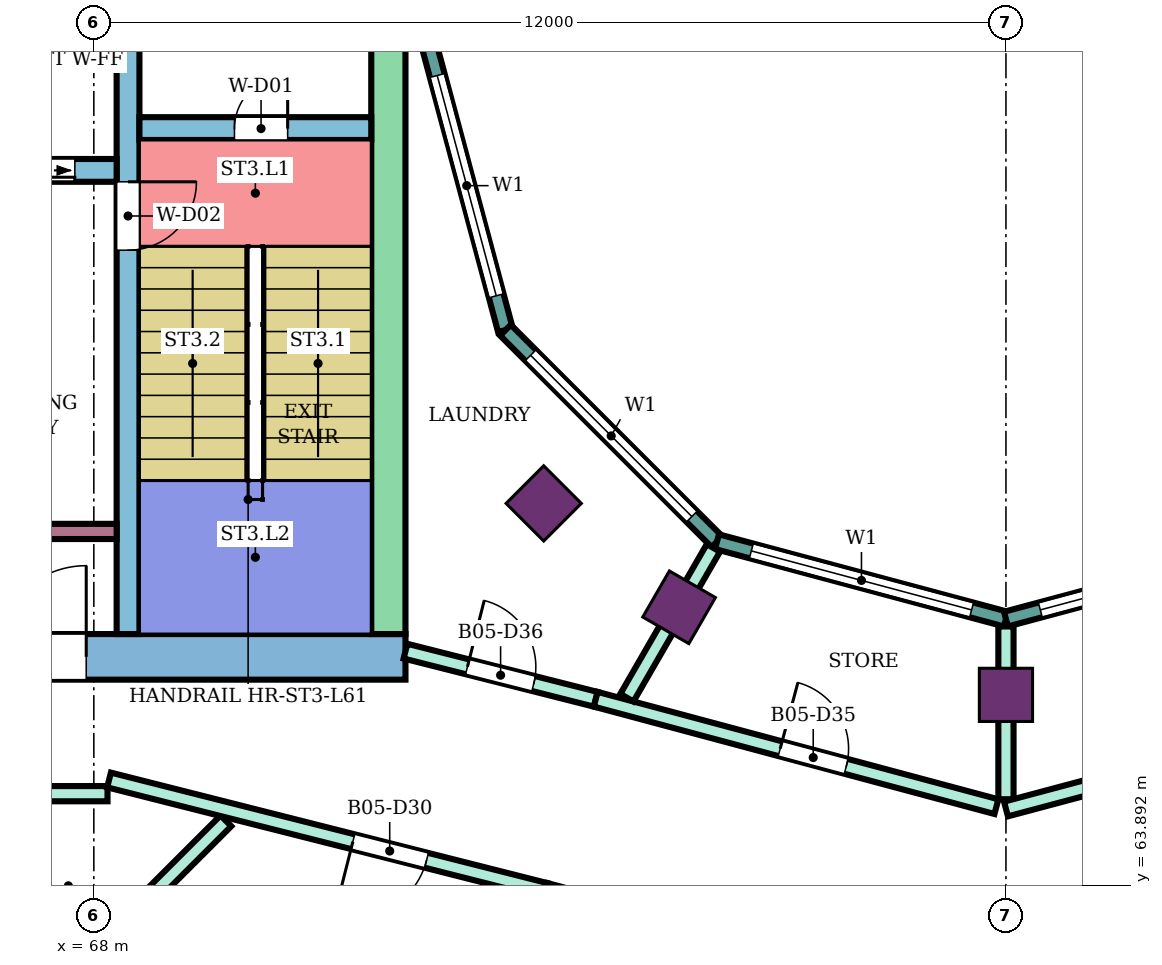
"""IFC4 building model, lengths in metres.
Left out: names, types, materials, properties, quantities, classifications, styles, units other than length and angle.
Written with IfcOpenShell. Run it as: python <this file> out.ifc"""

import sys

from ifc_helpers import new_model, si_unit, direction, frame, frame_2d, origin, origin_2d, place, context, subcontext, project, spatial, rectangle, extrude, element, fill, save


model = new_model("IFC4")
c1 = context("Model", 3, precision=1e-05, world=origin(), true_north=direction((0.0, 1.0)))
c2 = subcontext(c1, "Body", "Model", "MODEL_VIEW")
j1 = project(units=[si_unit("LENGTHUNIT", "METRE"), si_unit("PLANEANGLEUNIT", "RADIAN")], contexts=[c1])
p1 = place(None, origin())
s1 = spatial("IfcSite", under=j1, at=p1, CompositionType="ELEMENT")
p2 = place(p1, origin())
s2 = spatial("IfcBuilding", under=s1, at=p2, CompositionType="ELEMENT")
p3 = place(p2, frame((0.0, 0.0, 266.7)))
s3 = spatial("IfcBuildingStorey", under=s2, at=p3, CompositionType="ELEMENT", Elevation=266.7)
for number, where, z_axis, x_axis in (
    (1, (73.919, 68.919, 0.0), (0.0, 0.0, 1.0), (-0.707, -0.707, 0.0)),
    (2, (75.7, 67.552, 0.0), (0.0, 0.0, 1.0), (-0.5, -0.866, 0.0)),
    (3, (80.0, 66.4, 0.0), (0.0, 0.0, 1.0), (0.0, -1.0, 0.0)),
):
    element("IfcColumn", number, at=place(p3, frame(where, z_axis=z_axis, x_axis=x_axis)), inside=s3, PredefinedType="COLUMN", context=c2, shape_type="SweptSolid", body=[
        extrude(rectangle(XDim=0.7, YDim=0.7, at=origin_2d()), origin(), (0.0, 0.0, 1.0), 4.2),
    ])
p4 = place(p3, frame((72.1, 66.9, 0.0), z_axis=(0.0, 0.0, 1.0), x_axis=(-1.0, 0.0, 0.0)))
e4 = element("IfcWall", 4, at=p4, inside=s3, PredefinedType="SHEAR", context=c2, shape_type="SweptSolid", body=[
    extrude(rectangle(XDim=14.9, YDim=0.6, at=frame_2d((7.45, 0.0))), origin(), (0.0, 0.0, 1.0), 3.75),
])
p5 = place(p4, frame((4.2, 0.0, 0.0)))
e5 = element("IfcOpeningElement", 5, at=p5, cuts=e4, PredefinedType="OPENING", context=c2, shape_type="SweptSolid", body=[
    extrude(rectangle(XDim=2.4, YDim=2.4, at=frame_2d((1.2, 1.2))), frame((0.0, 0.31, 0.0), z_axis=(0.0, -1.0, 0.0), x_axis=(1.0, 0.0, 0.0)), (0.0, 0.0, 1.0), 0.62),
])
p6 = place(p3, frame((71.875, 75.0, 0.0), z_axis=(0.0, 0.0, 1.0), x_axis=(0.0, -1.0, 0.0)))
e6 = element("IfcWall", 6, at=p6, inside=s3, PredefinedType="SHEAR", context=c2, shape_type="SweptSolid", body=[
    extrude(rectangle(XDim=7.8, YDim=0.45, at=frame_2d((3.9, 0.0))), origin(), (0.0, 0.0, 1.0), 3.75),
])
p7 = place(p3, frame((68.45, 75.0, 0.0), z_axis=(0.0, 0.0, 1.0), x_axis=(0.0, -1.0, 0.0)))
e7 = element("IfcWall", 7, at=p7, inside=s3, PredefinedType="SHEAR", context=c2, shape_type="SweptSolid", body=[
    extrude(rectangle(XDim=7.8, YDim=0.3, at=frame_2d((3.9, 0.0))), origin(), (0.0, 0.0, 1.0), 3.75),
])
p8 = place(p7, frame((1.85, 0.0, 0.0)))
e8 = element("IfcOpeningElement", 8, at=p8, cuts=e7, PredefinedType="OPENING", context=c2, shape_type="SweptSolid", body=[
    extrude(rectangle(XDim=0.9, YDim=2.1, at=frame_2d((0.45, 1.05))), frame((0.0, 0.16, 0.0), z_axis=(0.0, -1.0, 0.0), x_axis=(1.0, 0.0, 0.0)), (0.0, 0.0, 1.0), 0.32),
])
p9 = place(p3, frame((71.65, 73.85, 0.0), z_axis=(0.0, 0.0, 1.0), x_axis=(-1.0, 0.0, 0.0)))
e9 = element("IfcWall", 9, at=p9, inside=s3, PredefinedType="SHEAR", context=c2, shape_type="SweptSolid", body=[
    extrude(rectangle(XDim=3.05, YDim=0.3, at=frame_2d((1.525, 0.0))), origin(), (0.0, 0.0, 1.0), 3.75),
])
p10 = place(p9, frame((1.1, 0.0, 0.0)))
e10 = element("IfcOpeningElement", 10, at=p10, cuts=e9, PredefinedType="OPENING", context=c2, shape_type="SweptSolid", body=[
    extrude(rectangle(XDim=0.7, YDim=2.0, at=frame_2d((0.35, 1.0))), frame((0.0, 0.16, 0.0), z_axis=(0.0, -1.0, 0.0), x_axis=(1.0, 0.0, 0.0)), (0.0, 0.0, 1.0), 0.32),
])
p11 = place(p3, frame((68.3, 73.3, 0.0), z_axis=(0.0, 0.0, 1.0), x_axis=(-1.0, 0.0, 0.0)))
e11 = element("IfcWall", 11, at=p11, inside=s3, PredefinedType="SHEAR", context=c2, shape_type="SweptSolid", body=[
    extrude(rectangle(XDim=11.1, YDim=0.3, at=frame_2d((5.55, 0.0))), origin(), (0.0, 0.0, 1.0), 3.75),
])
p12 = place(p11, frame((0.55, 0.0, 0.0)))
e12 = element("IfcOpeningElement", 12, at=p12, cuts=e11, PredefinedType="OPENING", context=c2, shape_type="SweptSolid", body=[
    extrude(rectangle(XDim=1.1, YDim=2.1, at=frame_2d((0.55, 1.05))), frame((0.0, 0.16, 0.0), z_axis=(0.0, -1.0, 0.0), x_axis=(1.0, 0.0, 0.0)), (0.0, 0.0, 1.0), 0.32),
])
p13 = place(p11, frame((3.0, 0.0, 0.0)))
e13 = element("IfcOpeningElement", 13, at=p13, cuts=e11, PredefinedType="OPENING", context=c2, shape_type="SweptSolid", body=[
    extrude(rectangle(XDim=1.2, YDim=2.1, at=frame_2d((0.6, 1.05))), frame((0.0, 0.16, 0.0), z_axis=(0.0, -1.0, 0.0), x_axis=(1.0, 0.0, 0.0)), (0.0, 0.0, 1.0), 0.32),
])
p14 = place(p11, frame((5.5, 0.0, 0.0)))
e14 = element("IfcOpeningElement", 14, at=p14, cuts=e11, PredefinedType="OPENING", context=c2, shape_type="SweptSolid", body=[
    extrude(rectangle(XDim=1.2, YDim=2.1, at=frame_2d((0.6, 1.05))), frame((0.0, 0.16, 0.0), z_axis=(0.0, -1.0, 0.0), x_axis=(1.0, 0.0, 0.0)), (0.0, 0.0, 1.0), 0.32),
])
p15 = place(p11, frame((8.85, 0.0, 0.0)))
e15 = element("IfcOpeningElement", 15, at=p15, cuts=e11, PredefinedType="OPENING", context=c2, shape_type="SweptSolid", body=[
    extrude(rectangle(XDim=0.9, YDim=2.1, at=frame_2d((0.45, 1.05))), frame((0.0, 0.16, 0.0), z_axis=(0.0, -1.0, 0.0), x_axis=(1.0, 0.0, 0.0)), (0.0, 0.0, 1.0), 0.32),
])
p16 = place(p3, frame((68.3, 68.55, 0.0), z_axis=(0.0, 0.0, 1.0), x_axis=(-1.0, 0.0, 0.0)))
e16 = element("IfcWall", 16, at=p16, inside=s3, PredefinedType="SHEAR", context=c2, shape_type="SweptSolid", body=[
    extrude(rectangle(XDim=4.35, YDim=0.2, at=frame_2d((2.175, 0.0))), origin(), (0.0, 0.0, 1.0), 3.75),
])
p17 = place(p3, frame((72.396, 75.0, 0.0), z_axis=(0.0, 0.0, 1.0), x_axis=(0.258789828301, -0.965933654434, 0.0)))
e17 = element("IfcWall", 17, at=p17, inside=s3, PredefinedType="NOTDEFINED", context=c2, shape_type="SweptSolid", body=[
    extrude(rectangle(XDim=3.936, YDim=0.2, at=frame_2d((1.968, 0.0))), origin(), (0.0, 0.0, 1.0), 4.2),
])
p18 = place(p17, frame((0.468, 0.0, 0.9)))
e18 = element("IfcOpeningElement", 18, at=p18, cuts=e17, PredefinedType="OPENING", context=c2, shape_type="SweptSolid", body=[
    extrude(rectangle(XDim=3.0, YDim=2.3, at=frame_2d((1.5, 1.15))), frame((0.0, 0.11, 0.0), z_axis=(0.0, -1.0, 0.0), x_axis=(1.0, 0.0, 0.0)), (0.0, 0.0, 1.0), 0.22),
])
p19 = place(p3, frame((73.415, 71.198, 0.0), z_axis=(0.0, 0.0, 1.0), x_axis=(0.707106781187, -0.707106781187, 0.0)))
e19 = element("IfcWall", 19, at=p19, inside=s3, PredefinedType="NOTDEFINED", context=c2, shape_type="SweptSolid", body=[
    extrude(rectangle(XDim=3.936, YDim=0.2, at=frame_2d((1.968, 0.0))), origin(), (0.0, 0.0, 1.0), 4.2),
])
p20 = place(p19, frame((0.468, 0.0, 0.9)))
e20 = element("IfcOpeningElement", 20, at=p20, cuts=e19, PredefinedType="OPENING", context=c2, shape_type="SweptSolid", body=[
    extrude(rectangle(XDim=3.0, YDim=2.3, at=frame_2d((1.5, 1.15))), frame((0.0, 0.11, 0.0), z_axis=(0.0, -1.0, 0.0), x_axis=(1.0, 0.0, 0.0)), (0.0, 0.0, 1.0), 0.22),
])
p21 = place(p3, frame((76.198, 68.415, 0.0), z_axis=(0.0, 0.0, 1.0), x_axis=(0.965933654434, -0.258789828301, 0.0)))
e21 = element("IfcWall", 21, at=p21, inside=s3, PredefinedType="NOTDEFINED", context=c2, shape_type="SweptSolid", body=[
    extrude(rectangle(XDim=3.936, YDim=0.2, at=frame_2d((1.968, 0.0))), origin(), (0.0, 0.0, 1.0), 4.2),
])
p22 = place(p21, frame((0.468, 0.0, 0.9)))
e22 = element("IfcOpeningElement", 22, at=p22, cuts=e21, PredefinedType="OPENING", context=c2, shape_type="SweptSolid", body=[
    extrude(rectangle(XDim=3.0, YDim=2.3, at=frame_2d((1.5, 1.15))), frame((0.0, 0.11, 0.0), z_axis=(0.0, -1.0, 0.0), x_axis=(1.0, 0.0, 0.0)), (0.0, 0.0, 1.0), 0.22),
])
p23 = place(p3, frame((80.0, 67.396, 0.0), z_axis=(0.0, 0.0, 1.0), x_axis=(0.965933654434, 0.258789828301, 0.0)))
e23 = element("IfcWall", 23, at=p23, inside=s3, PredefinedType="NOTDEFINED", context=c2, shape_type="SweptSolid", body=[
    extrude(rectangle(XDim=3.936, YDim=0.2, at=frame_2d((1.968, 0.0))), origin(), (0.0, 0.0, 1.0), 4.2),
])
p24 = place(p23, frame((0.468, 0.0, 0.9)))
e24 = element("IfcOpeningElement", 24, at=p24, cuts=e23, PredefinedType="OPENING", context=c2, shape_type="SweptSolid", body=[
    extrude(rectangle(XDim=3.0, YDim=2.3, at=frame_2d((1.5, 1.15))), frame((0.0, 0.11, 0.0), z_axis=(0.0, -1.0, 0.0), x_axis=(1.0, 0.0, 0.0)), (0.0, 0.0, 1.0), 0.22),
])
p25 = place(p3, frame((63.592, 58.6, 0.0), z_axis=(0.0, 0.0, 1.0), x_axis=(0.707261286313, 0.706952242293, 0.0)))
e25 = element("IfcWall", 25, at=p25, inside=s3, PredefinedType="PARTITIONING", context=c2, shape_type="SweptSolid", body=[
    extrude(rectangle(XDim=8.69, YDim=0.2, at=frame_2d((4.345, 0.0))), origin(), (0.0, 0.0, 1.0), 3.75),
])
p26 = place(p3, frame((65.2, 65.1, 0.0), z_axis=(0.0, 0.0, 1.0), x_axis=(1.0, 0.0, 0.0)))
e26 = element("IfcWall", 26, at=p26, inside=s3, PredefinedType="PARTITIONING", context=c2, shape_type="SweptSolid", body=[
    extrude(rectangle(XDim=2.98, YDim=0.2, at=frame_2d((1.49, 0.0))), origin(), (0.0, 0.0, 1.0), 3.75),
])
p27 = place(p26, frame((0.16, 0.0, 0.0)))
e27 = element("IfcOpeningElement", 27, at=p27, cuts=e26, PredefinedType="OPENING", context=c2, shape_type="SweptSolid", body=[
    extrude(rectangle(XDim=1.0, YDim=2.1, at=frame_2d((0.5, 1.05))), frame((0.0, 0.11, 0.0), z_axis=(0.0, -1.0, 0.0), x_axis=(1.0, 0.0, 0.0)), (0.0, 0.0, 1.0), 0.22),
])
p28 = place(p3, frame((68.2, 65.28, 0.0), z_axis=(0.0, 0.0, 1.0), x_axis=(0.969428528216, -0.245373854926, 0.0)))
e28 = element("IfcWall", 28, at=p28, inside=s3, PredefinedType="PARTITIONING", context=c2, shape_type="SweptSolid", body=[
    extrude(rectangle(XDim=5.928, YDim=0.2, at=frame_2d((2.964, 0.0))), origin(), (0.0, 0.0, 1.0), 3.75),
])
p29 = place(p28, frame((3.309, 0.0, 0.0)))
e29 = element("IfcOpeningElement", 29, at=p29, cuts=e28, PredefinedType="OPENING", context=c2, shape_type="SweptSolid", body=[
    extrude(rectangle(XDim=1.0, YDim=2.1, at=frame_2d((0.5, 1.05))), frame((0.0, 0.11, 0.0), z_axis=(0.0, -1.0, 0.0), x_axis=(1.0, 0.0, 0.0)), (0.0, 0.0, 1.0), 0.22),
])
p30 = place(p3, frame((72.1, 66.975, 0.0), z_axis=(0.0, 0.0, 1.0), x_axis=(0.969471314457, -0.245204752086, 0.0)))
e30 = element("IfcWall", 30, at=p30, inside=s3, PredefinedType="PARTITIONING", context=c2, shape_type="SweptSolid", body=[
    extrude(rectangle(XDim=2.582, YDim=0.2, at=frame_2d((1.291, 0.0))), origin(), (0.0, 0.0, 1.0), 3.75),
])
p31 = place(p30, frame((0.841, 0.0, 0.0)))
e31 = element("IfcOpeningElement", 31, at=p31, cuts=e30, PredefinedType="OPENING", context=c2, shape_type="SweptSolid", body=[
    extrude(rectangle(XDim=0.9, YDim=2.1, at=frame_2d((0.45, 1.05))), frame((0.0, 0.11, 0.0), z_axis=(0.0, -1.0, 0.0), x_axis=(1.0, 0.0, 0.0)), (0.0, 0.0, 1.0), 0.22),
])
p32 = place(p3, frame((73.947, 63.826, 0.0), z_axis=(0.0, 0.0, 1.0), x_axis=(0.965856500469, -0.259077634122, 0.0)))
e32 = element("IfcWall", 32, at=p32, inside=s3, PredefinedType="PARTITIONING", context=c2, shape_type="SweptSolid", body=[
    extrude(rectangle(XDim=6.217, YDim=0.2, at=frame_2d((3.108, 0.0))), origin(), (0.0, 0.0, 1.0), 3.75),
])
p33 = place(p3, frame((74.603, 66.342, 0.0), z_axis=(0.0, 0.0, 1.0), x_axis=(0.965920893652, -0.258837453254, 0.0)))
e33 = element("IfcWall", 33, at=p33, inside=s3, PredefinedType="PARTITIONING", context=c2, shape_type="SweptSolid", body=[
    extrude(rectangle(XDim=5.458, YDim=0.2, at=frame_2d((2.729, 0.0))), origin(), (0.0, 0.0, 1.0), 3.75),
])
p34 = place(p33, frame((2.512, 0.0, 0.0)))
e34 = element("IfcOpeningElement", 34, at=p34, cuts=e33, PredefinedType="OPENING", context=c2, shape_type="SweptSolid", body=[
    extrude(rectangle(XDim=0.9, YDim=2.1, at=frame_2d((0.45, 1.05))), frame((0.0, 0.11, 0.0), z_axis=(0.0, -1.0, 0.0), x_axis=(1.0, 0.0, 0.0)), (0.0, 0.0, 1.0), 0.22),
])
p35 = place(p3, frame((75.013, 66.363, 0.0), z_axis=(0.0, 0.0, 1.0), x_axis=(0.500097042406, 0.865969369075, 0.0)))
e35 = element("IfcWall", 35, at=p35, inside=s3, PredefinedType="PARTITIONING", context=c2, shape_type="SweptSolid", body=[
    extrude(rectangle(XDim=2.275, YDim=0.2, at=frame_2d((1.138, 0.0))), origin(), (0.0, 0.0, 1.0), 3.75),
])
p36 = place(p3, frame((80.048, 62.217, 0.0), z_axis=(0.0, 0.0, 1.0), x_axis=(0.966097920642, 0.258175923996, 0.0)))
e36 = element("IfcWall", 36, at=p36, inside=s3, PredefinedType="PARTITIONING", context=c2, shape_type="SweptSolid", body=[
    extrude(rectangle(XDim=6.217, YDim=0.2, at=frame_2d((3.108, 0.0))), origin(), (0.0, 0.0, 1.0), 3.75),
])
p37 = place(p36, frame((3.792, 0.0, 0.0)))
e37 = element("IfcOpeningElement", 37, at=p37, cuts=e36, PredefinedType="OPENING", context=c2, shape_type="SweptSolid", body=[
    extrude(rectangle(XDim=1.0, YDim=2.1, at=frame_2d((0.5, 1.05))), frame((0.0, 0.11, 0.0), z_axis=(0.0, -1.0, 0.0), x_axis=(1.0, 0.0, 0.0)), (0.0, 0.0, 1.0), 0.22),
])
p38 = place(p3, frame((80.0, 65.027, 0.0), z_axis=(0.0, 0.0, 1.0), x_axis=(0.0, 1.0, 0.0)))
e38 = element("IfcWall", 38, at=p38, inside=s3, PredefinedType="PARTITIONING", context=c2, shape_type="SweptSolid", body=[
    extrude(rectangle(XDim=2.273, YDim=0.2, at=frame_2d((1.136, 0.0))), origin(), (0.0, 0.0, 1.0), 3.75),
])
p39 = place(p3, frame((80.0, 64.898, 0.0), z_axis=(0.0, 0.0, 1.0), x_axis=(0.966236923997, 0.25765520896, 0.0)))
e39 = element("IfcWall", 39, at=p39, inside=s3, PredefinedType="PARTITIONING", context=c2, shape_type="SweptSolid", body=[
    extrude(rectangle(XDim=8.168, YDim=0.2, at=frame_2d((4.084, 0.0))), origin(), (0.0, 0.0, 1.0), 3.75),
])
p40 = place(p39, frame((1.893, 0.0, 0.0)))
e40 = element("IfcOpeningElement", 40, at=p40, cuts=e39, PredefinedType="OPENING", context=c2, shape_type="SweptSolid", body=[
    extrude(rectangle(XDim=1.8, YDim=2.1, at=frame_2d((0.9, 1.05))), frame((0.0, 0.11, 0.0), z_axis=(0.0, -1.0, 0.0), x_axis=(1.0, 0.0, 0.0)), (0.0, 0.0, 1.0), 0.22),
])
p41 = place(p18, origin())
e41 = element("IfcWindow", 41, at=p41, inside=s3, PartitioningType="SINGLE_PANEL", PredefinedType="WINDOW", context=c2, shape_type="SweptSolid", body=[
    extrude(rectangle(XDim=3.0, YDim=2.3, at=frame_2d((1.5, 1.15))), frame((0.0, 0.03, 0.0), z_axis=(0.0, -1.0, 0.0), x_axis=(1.0, 0.0, 0.0)), (0.0, 0.0, 1.0), 0.06),
])
fill(e18, e41)
p42 = place(p20, origin())
e42 = element("IfcWindow", 42, at=p42, inside=s3, PartitioningType="SINGLE_PANEL", PredefinedType="WINDOW", context=c2, shape_type="SweptSolid", body=[
    extrude(rectangle(XDim=3.0, YDim=2.3, at=frame_2d((1.5, 1.15))), frame((0.0, 0.03, 0.0), z_axis=(0.0, -1.0, 0.0), x_axis=(1.0, 0.0, 0.0)), (0.0, 0.0, 1.0), 0.06),
])
fill(e20, e42)
p43 = place(p22, origin())
e43 = element("IfcWindow", 43, at=p43, inside=s3, PartitioningType="SINGLE_PANEL", PredefinedType="WINDOW", context=c2, shape_type="SweptSolid", body=[
    extrude(rectangle(XDim=3.0, YDim=2.3, at=frame_2d((1.5, 1.15))), frame((0.0, 0.03, 0.0), z_axis=(0.0, -1.0, 0.0), x_axis=(1.0, 0.0, 0.0)), (0.0, 0.0, 1.0), 0.06),
])
fill(e22, e43)
p44 = place(p24, origin())
e44 = element("IfcWindow", 44, at=p44, inside=s3, PartitioningType="SINGLE_PANEL", PredefinedType="WINDOW", context=c2, shape_type="SweptSolid", body=[
    extrude(rectangle(XDim=3.0, YDim=2.3, at=frame_2d((1.5, 1.15))), frame((0.0, 0.03, 0.0), z_axis=(0.0, -1.0, 0.0), x_axis=(1.0, 0.0, 0.0)), (0.0, 0.0, 1.0), 0.06),
])
fill(e24, e44)
p45 = place(p29, frame((1.0, 0.0, 0.0), z_axis=(0.0, 0.0, 1.0), x_axis=(-1.0, 0.0, 0.0)))
e45 = element("IfcDoor", 45, at=p45, inside=s3, OperationType="SINGLE_SWING_RIGHT", PredefinedType="DOOR", context=c2, shape_type="SweptSolid", body=[
    extrude(rectangle(XDim=1.0, YDim=2.1, at=frame_2d((0.5, 1.05))), frame((0.0, 0.025, 0.0), z_axis=(0.0, -1.0, 0.0), x_axis=(1.0, 0.0, 0.0)), (0.0, 0.0, 1.0), 0.05),
])
fill(e29, e45)
p46 = place(p34, origin())
e46 = element("IfcDoor", 46, at=p46, inside=s3, OperationType="SINGLE_SWING_LEFT", PredefinedType="DOOR", context=c2, shape_type="SweptSolid", body=[
    extrude(rectangle(XDim=0.9, YDim=2.1, at=frame_2d((0.45, 1.05))), frame((0.0, 0.025, 0.0), z_axis=(0.0, -1.0, 0.0), x_axis=(1.0, 0.0, 0.0)), (0.0, 0.0, 1.0), 0.05),
])
fill(e34, e46)
p47 = place(p31, origin())
e47 = element("IfcDoor", 47, at=p47, inside=s3, OperationType="SINGLE_SWING_LEFT", PredefinedType="DOOR", context=c2, shape_type="SweptSolid", body=[
    extrude(rectangle(XDim=0.9, YDim=2.1, at=frame_2d((0.45, 1.05))), frame((0.0, 0.025, 0.0), z_axis=(0.0, -1.0, 0.0), x_axis=(1.0, 0.0, 0.0)), (0.0, 0.0, 1.0), 0.05),
])
fill(e31, e47)
p48 = place(p10, frame((0.7, 0.0, 0.0), z_axis=(0.0, 0.0, 1.0), x_axis=(-1.0, 0.0, 0.0)))
e48 = element("IfcDoor", 48, at=p48, inside=s3, OperationType="SINGLE_SWING_RIGHT", PredefinedType="DOOR", context=c2, shape_type="SweptSolid", body=[
    extrude(rectangle(XDim=0.7, YDim=2.0, at=frame_2d((0.35, 1.0))), frame((0.0, 0.025, 0.0), z_axis=(0.0, -1.0, 0.0), x_axis=(1.0, 0.0, 0.0)), (0.0, 0.0, 1.0), 0.05),
])
fill(e10, e48)
p49 = place(p8, origin())
e49 = element("IfcDoor", 49, at=p49, inside=s3, OperationType="SINGLE_SWING_LEFT", PredefinedType="DOOR", context=c2, shape_type="SweptSolid", body=[
    extrude(rectangle(XDim=0.9, YDim=2.1, at=frame_2d((0.45, 1.05))), frame((0.0, 0.025, 0.0), z_axis=(0.0, -1.0, 0.0), x_axis=(1.0, 0.0, 0.0)), (0.0, 0.0, 1.0), 0.05),
])
fill(e8, e49)
p50 = place(p12, origin())
e50 = element("IfcDoor", 50, at=p50, inside=s3, OperationType="DOUBLE_DOOR_SLIDING", PredefinedType="DOOR", context=c2, shape_type="SweptSolid", body=[
    extrude(rectangle(XDim=1.1, YDim=2.1, at=frame_2d((0.55, 1.05))), frame((0.0, 0.025, 0.0), z_axis=(0.0, -1.0, 0.0), x_axis=(1.0, 0.0, 0.0)), (0.0, 0.0, 1.0), 0.05),
])
fill(e12, e50)
p51 = place(p5, frame((2.4, 0.0, 0.0), z_axis=(0.0, 0.0, 1.0), x_axis=(-1.0, 0.0, 0.0)))
e51 = element("IfcDoor", 51, at=p51, inside=s3, OperationType="DOUBLE_DOOR_SINGLE_SWING", PredefinedType="DOOR", context=c2, shape_type="SweptSolid", body=[
    extrude(rectangle(XDim=2.4, YDim=2.4, at=frame_2d((1.2, 1.2))), frame((0.0, 0.025, 0.0), z_axis=(0.0, -1.0, 0.0), x_axis=(1.0, 0.0, 0.0)), (0.0, 0.0, 1.0), 0.05),
])
fill(e5, e51)
save(model, sys.argv[1])
